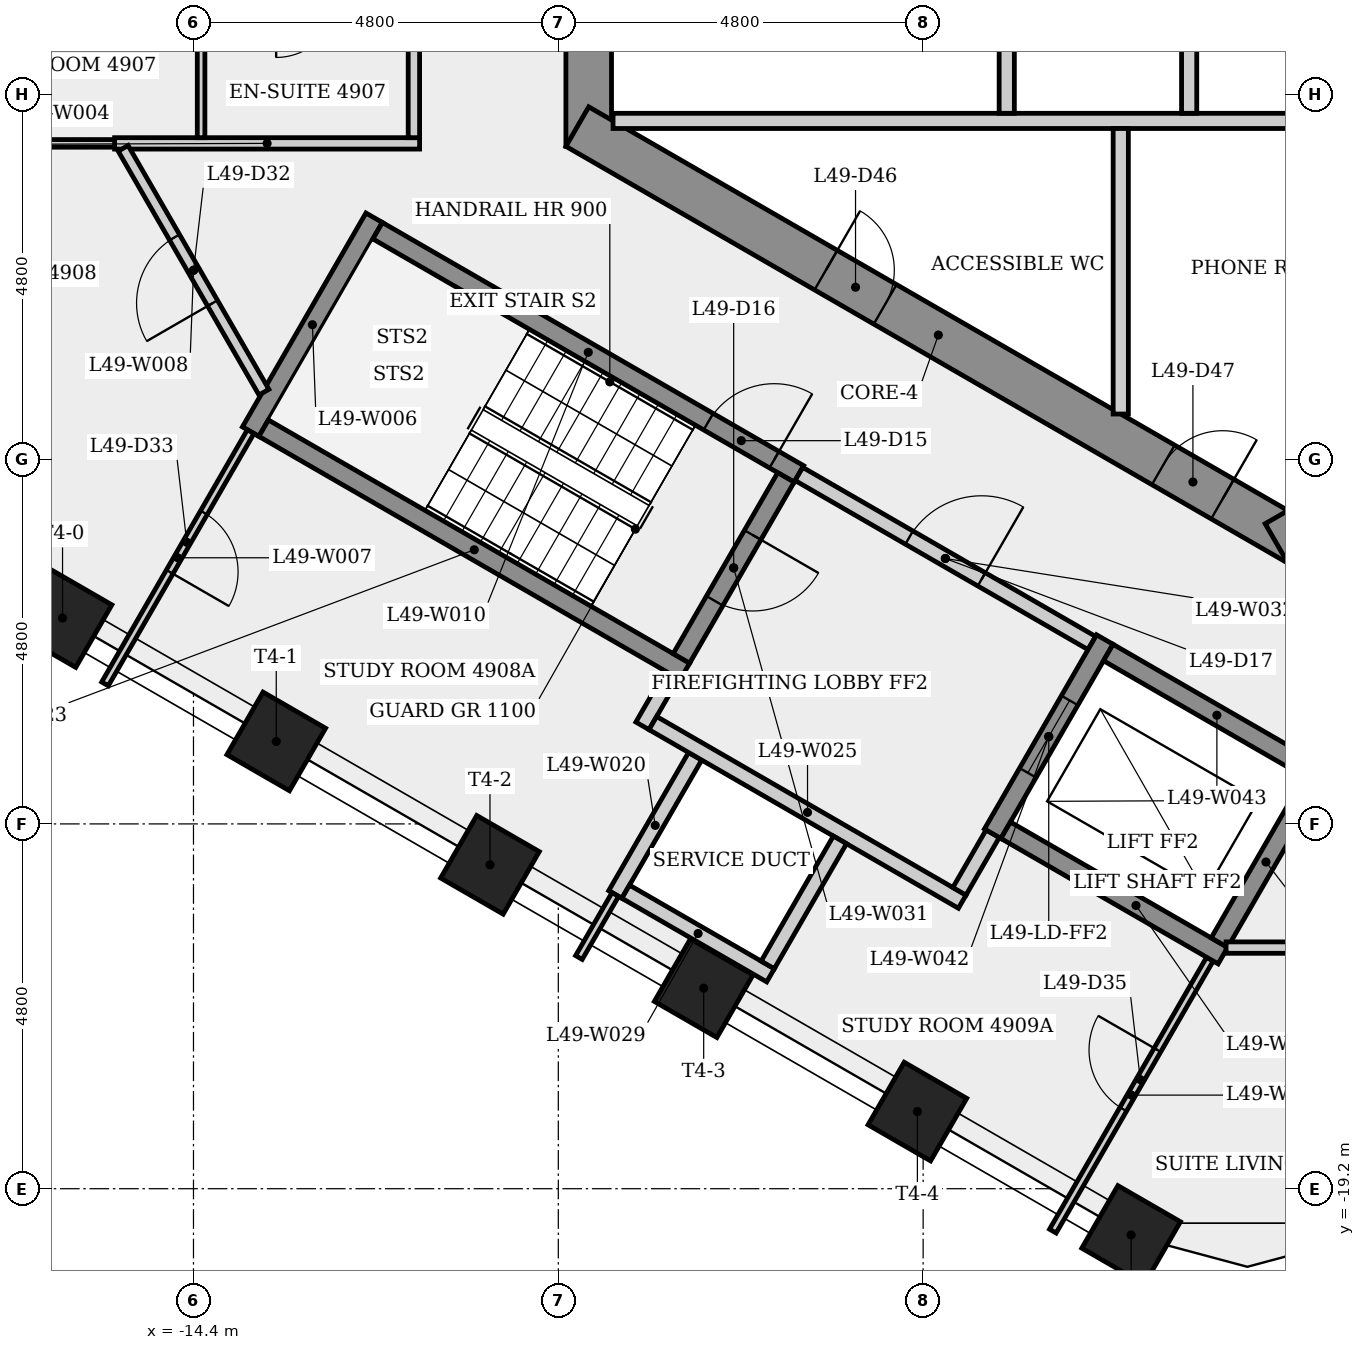
"""IFC4 building model, lengths in metres.
Left out: names, types, materials, properties, quantities, classifications, styles, units other than length and angle.
Written with IfcOpenShell. Run it as: python <this file> out.ifc"""

import sys

from ifc_helpers import new_model, si_unit, direction, frame, frame_2d, origin, origin_2d, place, context, subcontext, project, spatial, rectangle, extrude, element, fill, save


model = new_model("IFC4")
c1 = context("Model", 3, precision=1e-05, world=origin(), true_north=direction((0.0, 1.0)))
c2 = subcontext(c1, "Body", "Model", "MODEL_VIEW")
j1 = project(units=[si_unit("LENGTHUNIT", "METRE"), si_unit("PLANEANGLEUNIT", "RADIAN")], contexts=[c1])
p1 = place(None, origin())
s1 = spatial("IfcSite", under=j1, at=p1, CompositionType="ELEMENT")
p2 = place(p1, origin())
s2 = spatial("IfcBuilding", under=s1, at=p2, CompositionType="ELEMENT")
p3 = place(p2, frame((0.0, 0.0, 183.3)))
s3 = spatial("IfcBuildingStorey", under=s2, at=p3, CompositionType="ELEMENT", Elevation=183.3)
p4 = place(p3, frame((-9.2, 5.485, 0.0), z_axis=(0.0, 0.0, 1.0), x_axis=(0.0, -1.0, 0.0)))
e1 = element("IfcWall", 1, at=p4, inside=s3, PredefinedType="SHEAR", context=c2, shape_type="SweptSolid", body=[
    extrude(rectangle(XDim=10.97, YDim=0.6, at=frame_2d((5.485, 0.0))), origin(), (0.0, 0.0, 1.0), 3.4),
])
p5 = place(p4, frame((8.516, 0.0, 0.0)))
e2 = element("IfcOpeningElement", 2, at=p5, cuts=e1, PredefinedType="OPENING", context=c2, shape_type="SweptSolid", body=[
    extrude(rectangle(XDim=0.9, YDim=2.1, at=frame_2d((0.45, 1.05))), frame((0.0, 0.31, 0.0), z_axis=(0.0, -1.0, 0.0), x_axis=(1.0, 0.0, 0.0)), (0.0, 0.0, 1.0), 0.62),
])
p6 = place(p4, frame((4.685, 0.0, 0.0)))
e3 = element("IfcOpeningElement", 3, at=p6, cuts=e1, PredefinedType="OPENING", context=c2, shape_type="SweptSolid", body=[
    extrude(rectangle(XDim=1.6, YDim=2.1, at=frame_2d((0.8, 1.05))), frame((0.0, 0.31, 0.0), z_axis=(0.0, -1.0, 0.0), x_axis=(1.0, 0.0, 0.0)), (0.0, 0.0, 1.0), 0.62),
])
p7 = place(p3, frame((-9.35, -5.225, 0.0), z_axis=(0.0, 0.0, 1.0), x_axis=(0.866023993627, -0.500002442456, 0.0)))
e4 = element("IfcWall", 4, at=p7, inside=s3, PredefinedType="SHEAR", context=c2, shape_type="SweptSolid", body=[
    extrude(rectangle(XDim=10.97, YDim=0.6, at=frame_2d((5.485, 0.0))), origin(), (0.0, 0.0, 1.0), 3.4),
])
p8 = place(p7, frame((3.777, 0.0, 0.0)))
e5 = element("IfcOpeningElement", 5, at=p8, cuts=e4, PredefinedType="OPENING", context=c2, shape_type="SweptSolid", body=[
    extrude(rectangle(XDim=0.9, YDim=2.1, at=frame_2d((0.45, 1.05))), frame((0.0, 0.31, 0.0), z_axis=(0.0, -1.0, 0.0), x_axis=(1.0, 0.0, 0.0)), (0.0, 0.0, 1.0), 0.62),
])
p9 = place(p7, frame((8.903, 0.0, 0.0)))
e6 = element("IfcOpeningElement", 6, at=p9, cuts=e4, PredefinedType="OPENING", context=c2, shape_type="SweptSolid", body=[
    extrude(rectangle(XDim=0.9, YDim=2.1, at=frame_2d((0.45, 1.05))), frame((0.0, 0.31, 0.0), z_axis=(0.0, -1.0, 0.0), x_axis=(1.0, 0.0, 0.0)), (0.0, 0.0, 1.0), 0.62),
])
p10 = place(p3, frame((-0.15, -10.71, 0.0), z_axis=(0.0, 0.0, 1.0), x_axis=(0.866023993627, 0.500002442456, 0.0)))
e7 = element("IfcWall", 7, at=p10, inside=s3, PredefinedType="SHEAR", context=c2, shape_type="SweptSolid", body=[
    extrude(rectangle(XDim=10.97, YDim=0.6, at=frame_2d((5.485, 0.0))), origin(), (0.0, 0.0, 1.0), 3.4),
])
p11 = place(p10, frame((7.628, 0.0, 0.0)))
e8 = element("IfcOpeningElement", 8, at=p11, cuts=e7, PredefinedType="OPENING", context=c2, shape_type="SweptSolid", body=[
    extrude(rectangle(XDim=0.9, YDim=2.1, at=frame_2d((0.45, 1.05))), frame((0.0, 0.31, 0.0), z_axis=(0.0, -1.0, 0.0), x_axis=(1.0, 0.0, 0.0)), (0.0, 0.0, 1.0), 0.62),
])
for number, where, z_axis, x_axis in (
    (9, (-16.123, -11.692, 0.0), (0.0, 0.0, 1.0), (-0.5, -0.866, 0.0)),
    (10, (-13.311, -13.315, 0.0), (0.0, 0.0, 1.0), (-0.5, -0.866, 0.0)),
    (11, (-10.499, -14.938, 0.0), (0.0, 0.0, 1.0), (-0.5, -0.866, 0.0)),
    (12, (-7.687, -16.562, 0.0), (0.0, 0.0, 1.0), (-0.5, -0.866, 0.0)),
    (13, (-4.875, -18.185, 0.0), (0.0, 0.0, 1.0), (-0.5, -0.866, 0.0)),
    (14, (-2.064, -19.808, 0.0), (0.0, 0.0, 1.0), (-0.5, -0.866, 0.0)),
):
    element("IfcColumn", number, at=place(p3, frame(where, z_axis=z_axis, x_axis=x_axis)), inside=s3, PredefinedType="COLUMN", context=c2, shape_type="SweptSolid", body=[
        extrude(rectangle(XDim=0.95, YDim=0.95, at=origin_2d()), origin(), (0.0, 0.0, 1.0), 3.4),
    ])
p12 = place(p3, frame((-15.438, -5.446, 0.0), z_axis=(0.0, 0.0, 1.0), x_axis=(1.0, 0.0, 0.0)))
e15 = element("IfcWall", 15, at=p12, inside=s3, PredefinedType="PARTITIONING", context=c2, shape_type="SweptSolid", body=[
    extrude(rectangle(XDim=4.013, YDim=0.15, at=frame_2d((2.007, 0.0))), origin(), (0.0, 0.0, 1.0), 3.0),
])
p13 = place(p3, frame((-15.438, -5.446, 0.0), z_axis=(0.0, 0.0, 1.0), x_axis=(-1.0, 0.0, 0.0)))
e16 = element("IfcWall", 16, at=p13, inside=s3, PredefinedType="PARTITIONING", context=c2, shape_type="SweptSolid", body=[
    extrude(rectangle(XDim=2.215, YDim=0.1, at=frame_2d((1.107, 0.0))), origin(), (0.0, 0.0, 1.0), 3.0),
])
p14 = place(p3, frame((-14.3, -3.465, 0.0), z_axis=(0.0, 0.0, 1.0), x_axis=(0.0, -1.0, 0.0)))
e17 = element("IfcWall", 17, at=p14, inside=s3, PredefinedType="PARTITIONING", context=c2, shape_type="SweptSolid", body=[
    extrude(rectangle(XDim=1.906, YDim=0.1, at=frame_2d((0.953, 0.0))), origin(), (0.0, 0.0, 1.0), 3.0),
])
p15 = place(p3, frame((-13.648, -9.239, 0.0), z_axis=(0.0, 0.0, 1.0), x_axis=(0.500017246033, 0.866015446554, 0.0)))
e18 = element("IfcWall", 18, at=p15, inside=s3, PredefinedType="SHEAR", context=c2, shape_type="SweptSolid", body=[
    extrude(rectangle(XDim=3.25, YDim=0.25, at=frame_2d((1.625, 0.0))), origin(), (0.0, 0.0, 1.0), 3.0),
])
p16 = place(p3, frame((-13.648, -9.239, 0.0), z_axis=(0.0, 0.0, 1.0), x_axis=(-0.500044099915, -0.86599994119, 0.0)))
e19 = element("IfcWall", 19, at=p16, inside=s3, PredefinedType="PARTITIONING", context=c2, shape_type="SweptSolid", body=[
    extrude(rectangle(XDim=3.833, YDim=0.1, at=frame_2d((1.917, 0.0))), origin(), (0.0, 0.0, 1.0), 3.0),
])
p17 = place(p16, frame((1.231, 0.0, 0.0)))
e20 = element("IfcOpeningElement", 20, at=p17, cuts=e19, PredefinedType="OPENING", context=c2, shape_type="SweptSolid", body=[
    extrude(rectangle(XDim=0.9, YDim=2.1, at=frame_2d((0.45, 1.05))), frame((0.0, 0.06, 0.0), z_axis=(0.0, -1.0, 0.0), x_axis=(1.0, 0.0, 0.0)), (0.0, 0.0, 1.0), 0.12),
])
p18 = place(p3, frame((-13.473, -8.719, 0.0), z_axis=(0.0, 0.0, 1.0), x_axis=(-0.500022870649, 0.866012199007, 0.0)))
e21 = element("IfcWall", 21, at=p18, inside=s3, PredefinedType="PARTITIONING", context=c2, shape_type="SweptSolid", body=[
    extrude(rectangle(XDim=3.705, YDim=0.15, at=frame_2d((1.853, 0.0))), origin(), (0.0, 0.0, 1.0), 3.0),
])
p19 = place(p18, frame((1.352, 0.0, 0.0)))
e22 = element("IfcOpeningElement", 22, at=p19, cuts=e21, PredefinedType="OPENING", context=c2, shape_type="SweptSolid", body=[
    extrude(rectangle(XDim=1.0, YDim=2.1, at=frame_2d((0.5, 1.05))), frame((0.0, 0.085, 0.0), z_axis=(0.0, -1.0, 0.0), x_axis=(1.0, 0.0, 0.0)), (0.0, 0.0, 1.0), 0.17),
])
p20 = place(p3, frame((-11.977, -6.595, 0.0), z_axis=(0.0, 0.0, 1.0), x_axis=(0.866025499775, -0.499999833739, 0.0)))
e23 = element("IfcWall", 23, at=p20, inside=s3, PredefinedType="SHEAR", context=c2, shape_type="SweptSolid", body=[
    extrude(rectangle(XDim=6.4, YDim=0.25, at=frame_2d((3.2, 0.0))), origin(), (0.0, 0.0, 1.0), 3.0),
])
p21 = place(p20, frame((5.025, 0.0, 0.0)))
e24 = element("IfcOpeningElement", 24, at=p21, cuts=e23, PredefinedType="OPENING", context=c2, shape_type="SweptSolid", body=[
    extrude(rectangle(XDim=1.0, YDim=2.1, at=frame_2d((0.5, 1.05))), frame((0.0, 0.135, 0.0), z_axis=(0.0, -1.0, 0.0), x_axis=(1.0, 0.0, 0.0)), (0.0, 0.0, 1.0), 0.27),
])
p22 = place(p3, frame((-11.5, -5.371, 0.0), z_axis=(0.0, 0.0, 1.0), x_axis=(0.0, 1.0, 0.0)))
e25 = element("IfcWall", 25, at=p22, inside=s3, PredefinedType="PARTITIONING", context=c2, shape_type="SweptSolid", body=[
    extrude(rectangle(XDim=10.892, YDim=0.15, at=frame_2d((5.446, 0.0))), origin(), (0.0, 0.0, 1.0), 3.0),
])
p23 = place(p22, frame((6.686, 0.0, 0.0)))
e26 = element("IfcOpeningElement", 26, at=p23, cuts=e25, PredefinedType="OPENING", context=c2, shape_type="SweptSolid", body=[
    extrude(rectangle(XDim=1.0, YDim=2.1, at=frame_2d((0.5, 1.05))), frame((0.0, 0.085, 0.0), z_axis=(0.0, -1.0, 0.0), x_axis=(1.0, 0.0, 0.0)), (0.0, 0.0, 1.0), 0.17),
])
p24 = place(p22, frame((2.256, 0.0, 0.0)))
e27 = element("IfcOpeningElement", 27, at=p24, cuts=e25, PredefinedType="OPENING", context=c2, shape_type="SweptSolid", body=[
    extrude(rectangle(XDim=0.9, YDim=2.1, at=frame_2d((0.45, 1.05))), frame((0.0, 0.085, 0.0), z_axis=(0.0, -1.0, 0.0), x_axis=(1.0, 0.0, 0.0)), (0.0, 0.0, 1.0), 0.17),
])
p25 = place(p3, frame((-8.88, -5.15, 0.0), z_axis=(0.0, 0.0, 1.0), x_axis=(1.0, 0.0, 0.0)))
e28 = element("IfcWall", 28, at=p25, inside=s3, PredefinedType="PARTITIONING", context=c2, shape_type="SweptSolid", body=[
    extrude(rectangle(XDim=11.205, YDim=0.2, at=frame_2d((5.603, 0.0))), origin(), (0.0, 0.0, 1.0), 3.0),
])
p26 = place(p3, frame((-8.85, -15.329, 0.0), z_axis=(0.0, 0.0, 1.0), x_axis=(0.500027713859, 0.866009402589, 0.0)))
e29 = element("IfcWall", 29, at=p26, inside=s3, PredefinedType="PLUMBINGWALL", context=c2, shape_type="SweptSolid", body=[
    extrude(rectangle(XDim=2.1, YDim=0.2, at=frame_2d((1.05, 0.0))), origin(), (0.0, 0.0, 1.0), 3.0),
])
p27 = place(p3, frame((-8.493, -13.11, 0.0), z_axis=(0.0, 0.0, 1.0), x_axis=(0.500067724834, 0.865986299303, 0.0)))
e30 = element("IfcWall", 30, at=p27, inside=s3, PredefinedType="PARTITIONING", context=c2, shape_type="SweptSolid", body=[
    extrude(rectangle(XDim=0.775, YDim=0.2, at=frame_2d((0.388, 0.0))), origin(), (0.0, 0.0, 1.0), 3.0),
])
p28 = place(p3, frame((-7.935, -12.393, 0.0), z_axis=(0.0, 0.0, 1.0), x_axis=(-0.866025499775, 0.499999833739, 0.0)))
e31 = element("IfcWall", 31, at=p28, inside=s3, PredefinedType="SHEAR", context=c2, shape_type="SweptSolid", body=[
    extrude(rectangle(XDim=6.4, YDim=0.25, at=frame_2d((3.2, 0.0))), origin(), (0.0, 0.0, 1.0), 3.0),
])
p29 = place(p3, frame((-9.329, -16.158, 0.0), z_axis=(0.0, 0.0, 1.0), x_axis=(0.499950501706, 0.866053979752, 0.0)))
e32 = element("IfcWall", 32, at=p29, inside=s3, PredefinedType="PARTITIONING", context=c2, shape_type="SweptSolid", body=[
    extrude(rectangle(XDim=0.958, YDim=0.1, at=frame_2d((0.479, 0.0))), origin(), (0.0, 0.0, 1.0), 3.0),
])
p30 = place(p3, frame((-8.356, -13.073, 0.0), z_axis=(0.0, 0.0, 1.0), x_axis=(0.866038532462, -0.499977259774, 0.0)))
e33 = element("IfcWall", 33, at=p30, inside=s3, PredefinedType="PARTITIONING", context=c2, shape_type="SweptSolid", body=[
    extrude(rectangle(XDim=4.7, YDim=0.2, at=frame_2d((2.35, 0.0))), origin(), (0.0, 0.0, 1.0), 3.0),
])
p31 = place(p3, frame((-6.808, -16.392, 0.0), z_axis=(0.0, 0.0, 1.0), x_axis=(-0.866008176907, 0.50002983664, 0.0)))
e34 = element("IfcWall", 34, at=p31, inside=s3, PredefinedType="PLUMBINGWALL", context=c2, shape_type="SweptSolid", body=[
    extrude(rectangle(XDim=2.2, YDim=0.2, at=frame_2d((1.1, 0.0))), origin(), (0.0, 0.0, 1.0), 3.0),
])
p32 = place(p3, frame((-6.605, -9.841, 0.0), z_axis=(0.0, 0.0, 1.0), x_axis=(-0.499996545922, -0.866027397988, 0.0)))
e35 = element("IfcWall", 35, at=p32, inside=s3, PredefinedType="SHEAR", context=c2, shape_type="SweptSolid", body=[
    extrude(rectangle(XDim=2.75, YDim=0.25, at=frame_2d((1.375, 0.0))), origin(), (0.0, 0.0, 1.0), 3.0),
])
p33 = place(p32, frame((0.875, 0.0, 0.0)))
e36 = element("IfcOpeningElement", 36, at=p33, cuts=e35, PredefinedType="OPENING", context=c2, shape_type="SweptSolid", body=[
    extrude(rectangle(XDim=1.0, YDim=2.1, at=frame_2d((0.5, 1.05))), frame((0.0, 0.135, 0.0), z_axis=(0.0, -1.0, 0.0), x_axis=(1.0, 0.0, 0.0)), (0.0, 0.0, 1.0), 0.27),
])
p34 = place(p3, frame((-6.435, -9.795, 0.0), z_axis=(0.0, 0.0, 1.0), x_axis=(0.866012907634, -0.500021643343, 0.0)))
e37 = element("IfcWall", 37, at=p34, inside=s3, PredefinedType="PARTITIONING", context=c2, shape_type="SweptSolid", body=[
    extrude(rectangle(XDim=4.45, YDim=0.2, at=frame_2d((2.225, 0.0))), origin(), (0.0, 0.0, 1.0), 3.0),
])
p35 = place(p34, frame((1.675, 0.0, 0.0)))
e38 = element("IfcOpeningElement", 38, at=p35, cuts=e37, PredefinedType="OPENING", context=c2, shape_type="SweptSolid", body=[
    extrude(rectangle(XDim=1.1, YDim=2.1, at=frame_2d((0.55, 1.05))), frame((0.0, 0.11, 0.0), z_axis=(0.0, -1.0, 0.0), x_axis=(1.0, 0.0, 0.0)), (0.0, 0.0, 1.0), 0.22),
])
p36 = place(p3, frame((-5.895, -14.61, 0.0), z_axis=(0.0, 0.0, 1.0), x_axis=(-0.500022797313, -0.86601224135, 0.0)))
e39 = element("IfcWall", 39, at=p36, inside=s3, PredefinedType="PLUMBINGWALL", context=c2, shape_type="SweptSolid", body=[
    extrude(rectangle(XDim=1.9, YDim=0.2, at=frame_2d((0.95, 0.0))), origin(), (0.0, 0.0, 1.0), 3.0),
])
p37 = place(p3, frame((-3.885, -14.529, 0.0), z_axis=(0.0, 0.0, 1.0), x_axis=(-0.499859285417, -0.866106630146, 0.0)))
e40 = element("IfcWall", 40, at=p37, inside=s3, PredefinedType="PARTITIONING", context=c2, shape_type="SweptSolid", body=[
    extrude(rectangle(XDim=0.875, YDim=0.2, at=frame_2d((0.438, 0.0))), origin(), (0.0, 0.0, 1.0), 3.0),
])
p38 = place(p3, frame((-3.7, -1.9, 0.0), z_axis=(0.0, 0.0, 1.0), x_axis=(0.0, -1.0, 0.0)))
e41 = element("IfcWall", 41, at=p38, inside=s3, PredefinedType="PARTITIONING", context=c2, shape_type="SweptSolid", body=[
    extrude(rectangle(XDim=3.15, YDim=0.2, at=frame_2d((1.575, 0.0))), origin(), (0.0, 0.0, 1.0), 3.0),
])
p39 = place(p3, frame((-3.094, -19.758, 0.0), z_axis=(0.0, 0.0, 1.0), x_axis=(0.500027577057, 0.866009481578, 0.0)))
e42 = element("IfcWall", 42, at=p39, inside=s3, PredefinedType="PARTITIONING", context=c2, shape_type="SweptSolid", body=[
    extrude(rectangle(XDim=4.133, YDim=0.1, at=frame_2d((2.066, 0.0))), origin(), (0.0, 0.0, 1.0), 3.0),
])
p40 = place(p39, frame((1.852, 0.0, 0.0)))
e43 = element("IfcOpeningElement", 43, at=p40, cuts=e42, PredefinedType="OPENING", context=c2, shape_type="SweptSolid", body=[
    extrude(rectangle(XDim=0.9, YDim=2.1, at=frame_2d((0.45, 1.05))), frame((0.0, 0.06, 0.0), z_axis=(0.0, -1.0, 0.0), x_axis=(1.0, 0.0, 0.0)), (0.0, 0.0, 1.0), 0.12),
])
p41 = place(p3, frame((-2.41, -11.974, 0.0), z_axis=(0.0, 0.0, 1.0), x_axis=(-0.500001826776, -0.866024349092, 0.0)))
e44 = element("IfcWall", 44, at=p41, inside=s3, PredefinedType="SHEAR", context=c2, shape_type="SweptSolid", body=[
    extrude(rectangle(XDim=2.95, YDim=0.25, at=frame_2d((1.475, 0.0))), origin(), (0.0, 0.0, 1.0), 3.0),
])
p42 = place(p41, frame((0.925, 0.0, 0.0)))
e45 = element("IfcOpeningElement", 45, at=p42, cuts=e44, PredefinedType="OPENING", context=c2, shape_type="SweptSolid", body=[
    extrude(rectangle(XDim=1.1, YDim=2.1, at=frame_2d((0.55, 1.05))), frame((0.0, 0.135, 0.0), z_axis=(0.0, -1.0, 0.0), x_axis=(1.0, 0.0, 0.0)), (0.0, 0.0, 1.0), 0.27),
])
p43 = place(p3, frame((-2.364, -12.145, 0.0), z_axis=(0.0, 0.0, 1.0), x_axis=(0.866040211805, -0.499974350878, 0.0)))
e46 = element("IfcWall", 46, at=p43, inside=s3, PredefinedType="SHEAR", context=c2, shape_type="SweptSolid", body=[
    extrude(rectangle(XDim=3.3, YDim=0.25, at=frame_2d((1.65, 0.0))), origin(), (0.0, 0.0, 1.0), 3.0),
])
p44 = place(p3, frame((-2.2, -5.25, 0.0), z_axis=(0.0, 0.0, 1.0), x_axis=(0.0, -1.0, 0.0)))
e47 = element("IfcWall", 47, at=p44, inside=s3, PredefinedType="PARTITIONING", context=c2, shape_type="SweptSolid", body=[
    extrude(rectangle(XDim=3.757, YDim=0.2, at=frame_2d((1.878, 0.0))), origin(), (0.0, 0.0, 1.0), 3.0),
])
p45 = place(p3, frame((-1.3, -1.9, 0.0), z_axis=(0.0, 0.0, 1.0), x_axis=(0.0, -1.0, 0.0)))
e48 = element("IfcWall", 48, at=p45, inside=s3, PredefinedType="PARTITIONING", context=c2, shape_type="SweptSolid", body=[
    extrude(rectangle(XDim=3.15, YDim=0.2, at=frame_2d((1.575, 0.0))), origin(), (0.0, 0.0, 1.0), 3.0),
])
p46 = place(p3, frame((-0.856, -16.133, 0.0), z_axis=(0.0, 0.0, 1.0), x_axis=(-0.866021716278, 0.500006386895, 0.0)))
e49 = element("IfcWall", 49, at=p46, inside=s3, PredefinedType="SHEAR", context=c2, shape_type="SweptSolid", body=[
    extrude(rectangle(XDim=3.3, YDim=0.25, at=frame_2d((1.65, 0.0))), origin(), (0.0, 0.0, 1.0), 3.0),
])
p47 = place(p3, frame((-0.902, -15.962, 0.0), z_axis=(0.0, 0.0, 1.0), x_axis=(0.500061746146, 0.865989751695, 0.0)))
e50 = element("IfcWall", 50, at=p47, inside=s3, PredefinedType="SHEAR", context=c2, shape_type="SweptSolid", body=[
    extrude(rectangle(XDim=2.45, YDim=0.25, at=frame_2d((1.225, 0.0))), origin(), (0.0, 0.0, 1.0), 3.4),
])
p48 = place(p3, frame((3.636, -16.028, 0.0), z_axis=(0.0, 0.0, 1.0), x_axis=(-1.0, 0.0, 0.0)))
e51 = element("IfcWall", 51, at=p48, inside=s3, PredefinedType="PARTITIONING", context=c2, shape_type="SweptSolid", body=[
    extrude(rectangle(XDim=4.451, YDim=0.15, at=frame_2d((2.225, 0.0))), origin(), (0.0, 0.0, 1.0), 3.0),
])
p49 = place(p48, frame((1.725, 0.0, 0.0)))
e52 = element("IfcOpeningElement", 52, at=p49, cuts=e51, PredefinedType="OPENING", context=c2, shape_type="SweptSolid", body=[
    extrude(rectangle(XDim=1.0, YDim=2.1, at=frame_2d((0.5, 1.05))), frame((0.0, 0.085, 0.0), z_axis=(0.0, -1.0, 0.0), x_axis=(1.0, 0.0, 0.0)), (0.0, 0.0, 1.0), 0.17),
])
p50 = place(p21, origin())
e53 = element("IfcDoor", 53, at=p50, inside=s3, OperationType="SINGLE_SWING_RIGHT", PredefinedType="DOOR", context=c2, shape_type="SweptSolid", body=[
    extrude(rectangle(XDim=1.0, YDim=2.1, at=frame_2d((0.5, 1.05))), frame((0.0, 0.025, 0.0), z_axis=(0.0, -1.0, 0.0), x_axis=(1.0, 0.0, 0.0)), (0.0, 0.0, 1.0), 0.05),
])
fill(e24, e53)
p51 = place(p33, origin())
e54 = element("IfcDoor", 54, at=p51, inside=s3, OperationType="SINGLE_SWING_LEFT", PredefinedType="DOOR", context=c2, shape_type="SweptSolid", body=[
    extrude(rectangle(XDim=1.0, YDim=2.1, at=frame_2d((0.5, 1.05))), frame((0.0, 0.025, 0.0), z_axis=(0.0, -1.0, 0.0), x_axis=(1.0, 0.0, 0.0)), (0.0, 0.0, 1.0), 0.05),
])
fill(e36, e54)
p52 = place(p35, origin())
e55 = element("IfcDoor", 55, at=p52, inside=s3, OperationType="SINGLE_SWING_RIGHT", PredefinedType="DOOR", context=c2, shape_type="SweptSolid", body=[
    extrude(rectangle(XDim=1.1, YDim=2.1, at=frame_2d((0.55, 1.05))), frame((0.0, 0.025, 0.0), z_axis=(0.0, -1.0, 0.0), x_axis=(1.0, 0.0, 0.0)), (0.0, 0.0, 1.0), 0.05),
])
fill(e38, e55)
p53 = place(p42, origin())
e56 = element("IfcDoor", 56, at=p53, inside=s3, OperationType="SLIDING_TO_LEFT", PredefinedType="DOOR", context=c2, shape_type="SweptSolid", body=[
    extrude(rectangle(XDim=1.1, YDim=2.1, at=frame_2d((0.55, 1.05))), frame((0.0, 0.025, 0.0), z_axis=(0.0, -1.0, 0.0), x_axis=(1.0, 0.0, 0.0)), (0.0, 0.0, 1.0), 0.05),
])
fill(e45, e56)
p54 = place(p19, origin())
e57 = element("IfcDoor", 57, at=p54, inside=s3, OperationType="SINGLE_SWING_LEFT", PredefinedType="DOOR", context=c2, shape_type="SweptSolid", body=[
    extrude(rectangle(XDim=1.0, YDim=2.1, at=frame_2d((0.5, 1.05))), frame((0.0, 0.025, 0.0), z_axis=(0.0, -1.0, 0.0), x_axis=(1.0, 0.0, 0.0)), (0.0, 0.0, 1.0), 0.05),
])
fill(e22, e57)
p55 = place(p17, origin())
e58 = element("IfcDoor", 58, at=p55, inside=s3, OperationType="SINGLE_SWING_RIGHT", PredefinedType="DOOR", context=c2, shape_type="SweptSolid", body=[
    extrude(rectangle(XDim=0.9, YDim=2.1, at=frame_2d((0.45, 1.05))), frame((0.0, 0.025, 0.0), z_axis=(0.0, -1.0, 0.0), x_axis=(1.0, 0.0, 0.0)), (0.0, 0.0, 1.0), 0.05),
])
fill(e20, e58)
p56 = place(p40, origin())
e59 = element("IfcDoor", 59, at=p56, inside=s3, OperationType="SINGLE_SWING_RIGHT", PredefinedType="DOOR", context=c2, shape_type="SweptSolid", body=[
    extrude(rectangle(XDim=0.9, YDim=2.1, at=frame_2d((0.45, 1.05))), frame((0.0, 0.025, 0.0), z_axis=(0.0, -1.0, 0.0), x_axis=(1.0, 0.0, 0.0)), (0.0, 0.0, 1.0), 0.05),
])
fill(e43, e59)
p57 = place(p8, origin())
e60 = element("IfcDoor", 60, at=p57, inside=s3, OperationType="SINGLE_SWING_LEFT", PredefinedType="DOOR", context=c2, shape_type="SweptSolid", body=[
    extrude(rectangle(XDim=0.9, YDim=2.1, at=frame_2d((0.45, 1.05))), frame((0.0, 0.025, 0.0), z_axis=(0.0, -1.0, 0.0), x_axis=(1.0, 0.0, 0.0)), (0.0, 0.0, 1.0), 0.05),
])
fill(e5, e60)
p58 = place(p9, origin())
e61 = element("IfcDoor", 61, at=p58, inside=s3, OperationType="SINGLE_SWING_RIGHT", PredefinedType="DOOR", context=c2, shape_type="SweptSolid", body=[
    extrude(rectangle(XDim=0.9, YDim=2.1, at=frame_2d((0.45, 1.05))), frame((0.0, 0.025, 0.0), z_axis=(0.0, -1.0, 0.0), x_axis=(1.0, 0.0, 0.0)), (0.0, 0.0, 1.0), 0.05),
])
fill(e6, e61)
save(model, sys.argv[1])
